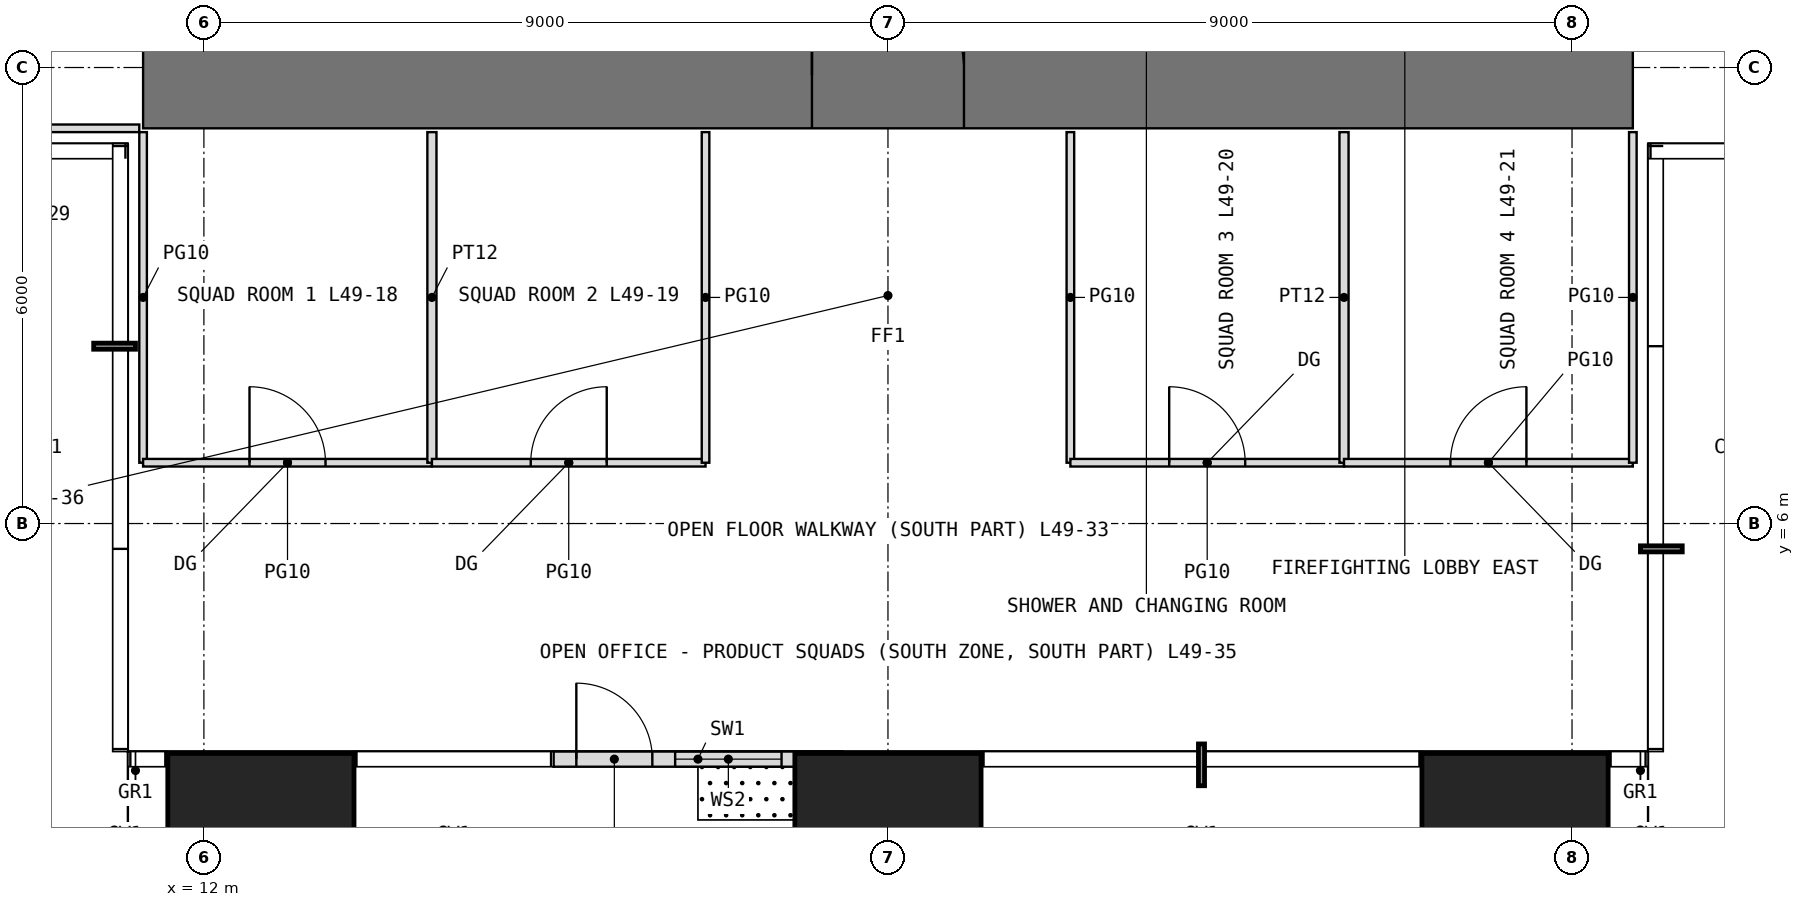
"""IFC4 building model, lengths in metres.
Left out: names, types, materials, properties, quantities, classifications, styles, units other than length and angle.
Written with IfcOpenShell. Run it as: python <this file> out.ifc"""

import sys

from ifc_helpers import new_model, si_unit, direction, frame, frame_2d, origin, origin_2d, place, context, subcontext, project, spatial, rectangle, extrude, element, fill, save


model = new_model("IFC4")
c1 = context("Model", 3, precision=1e-05, world=origin(), true_north=direction((0.0, 1.0)))
c2 = subcontext(c1, "Body", "Model", "MODEL_VIEW")
j1 = project(units=[si_unit("LENGTHUNIT", "METRE"), si_unit("PLANEANGLEUNIT", "RADIAN")], contexts=[c1])
p1 = place(None, origin())
s1 = spatial("IfcSite", under=j1, at=p1, CompositionType="ELEMENT")
p2 = place(p1, origin())
s2 = spatial("IfcBuilding", under=s1, at=p2, CompositionType="ELEMENT")
p3 = place(p2, frame((0.0, 0.0, 206.5)))
s3 = spatial("IfcBuildingStorey", under=s2, at=p3, CompositionType="ELEMENT", Elevation=206.5)
for number, where, z_axis, x_axis in (
    (1, (12.75, 1.75, 0.0), (0.0, 0.0, 1.0), (1.0, 0.0, 0.0)),
    (2, (21.0, 1.75, 0.0), (0.0, 0.0, 1.0), (1.0, 0.0, 0.0)),
    (3, (29.25, 1.75, 0.0), (0.0, 0.0, 1.0), (1.0, 0.0, 0.0)),
):
    element("IfcColumn", number, at=place(p3, frame(where, z_axis=z_axis, x_axis=x_axis)), inside=s3, PredefinedType="COLUMN", context=c2, shape_type="SweptSolid", body=[
        extrude(rectangle(XDim=2.45, YDim=2.45, at=origin_2d()), origin(), (0.0, 0.0, 1.0), 4.0),
    ])
p4 = place(p3, frame((16.6, 2.9, 0.0), z_axis=(0.0, 0.0, 1.0), x_axis=(1.0, 0.0, 0.0)))
e4 = element("IfcWall", 4, at=p4, inside=s3, PredefinedType="USERDEFINED", context=c2, shape_type="SweptSolid", body=[
    extrude(rectangle(XDim=3.8, YDim=0.2, at=frame_2d((1.9, 0.0))), origin(), (0.0, 0.0, 1.0), 3.75),
])
p5 = place(p4, frame((0.3, 0.0, 0.0)))
e5 = element("IfcOpeningElement", 5, at=p5, cuts=e4, PredefinedType="OPENING", context=c2, shape_type="SweptSolid", body=[
    extrude(rectangle(XDim=1.0, YDim=2.4, at=frame_2d((0.5, 1.2))), frame((0.0, 0.11, 0.0), z_axis=(0.0, -1.0, 0.0), x_axis=(1.0, 0.0, 0.0)), (0.0, 0.0, 1.0), 0.22),
])
p6 = place(p4, frame((1.6, 0.0, 0.3)))
e6 = element("IfcOpeningElement", 6, at=p6, cuts=e4, PredefinedType="OPENING", context=c2, shape_type="SweptSolid", body=[
    extrude(rectangle(XDim=1.4, YDim=2.7, at=frame_2d((0.7, 1.35))), frame((0.0, 0.11, 0.0), z_axis=(0.0, -1.0, 0.0), x_axis=(1.0, 0.0, 0.0)), (0.0, 0.0, 1.0), 0.22),
])
p7 = place(p3, frame((11.2, 11.9, -0.05), z_axis=(0.0, 0.0, 1.0), x_axis=(1.0, 0.0, 0.0)))
e7 = element("IfcWall", 7, at=p7, inside=s3, PredefinedType="SHEAR", context=c2, shape_type="SweptSolid", body=[
    extrude(rectangle(XDim=19.6, YDim=1.4, at=frame_2d((9.8, 0.0))), origin(), (0.0, 0.0, 1.0), 4.0),
])
p8 = place(p7, frame((8.8, 0.0, 0.05)))
e8 = element("IfcOpeningElement", 8, at=p8, cuts=e7, PredefinedType="OPENING", context=c2, shape_type="SweptSolid", body=[
    extrude(rectangle(XDim=2.0, YDim=2.2, at=frame_2d((1.0, 1.1))), frame((0.0, 0.71, 0.0), z_axis=(0.0, -1.0, 0.0), x_axis=(1.0, 0.0, 0.0)), (0.0, 0.0, 1.0), 1.42),
])
p9 = place(p3, frame((8.4, 11.2, 0.0), z_axis=(0.0, 0.0, 1.0), x_axis=(1.0, 0.0, 0.0)))
e9 = element("IfcWall", 9, at=p9, inside=s3, PredefinedType="PARTITIONING", context=c2, shape_type="SweptSolid", body=[
    extrude(rectangle(XDim=2.75, YDim=0.1, at=frame_2d((1.375, 0.0))), origin(), (0.0, 0.0, 1.0), 3.75),
])
p10 = place(p3, frame((11.2, 6.8, 0.0), z_axis=(0.0, 0.0, 1.0), x_axis=(0.0, 1.0, 0.0)))
e10 = element("IfcWall", 10, at=p10, inside=s3, PredefinedType="PARTITIONING", context=c2, shape_type="SweptSolid", body=[
    extrude(rectangle(XDim=4.35, YDim=0.1, at=frame_2d((2.175, 0.0))), origin(), (0.0, 0.0, 1.0), 3.75),
])
p11 = place(p3, frame((11.2, 6.8, 0.0), z_axis=(0.0, 0.0, 1.0), x_axis=(1.0, 0.0, 0.0)))
e11 = element("IfcWall", 11, at=p11, inside=s3, PredefinedType="PARTITIONING", context=c2, shape_type="SweptSolid", body=[
    extrude(rectangle(XDim=3.8, YDim=0.1, at=frame_2d((1.9, 0.0))), origin(), (0.0, 0.0, 1.0), 3.75),
])
p12 = place(p11, frame((1.4, 0.0, 0.0)))
e12 = element("IfcOpeningElement", 12, at=p12, cuts=e11, PredefinedType="OPENING", context=c2, shape_type="SweptSolid", body=[
    extrude(rectangle(XDim=1.0, YDim=2.4, at=frame_2d((0.5, 1.2))), frame((0.0, 0.06, 0.0), z_axis=(0.0, -1.0, 0.0), x_axis=(1.0, 0.0, 0.0)), (0.0, 0.0, 1.0), 0.12),
])
p13 = place(p3, frame((15.0, 6.8, 0.0), z_axis=(0.0, 0.0, 1.0), x_axis=(0.0, 1.0, 0.0)))
e13 = element("IfcWall", 13, at=p13, inside=s3, PredefinedType="PARTITIONING", context=c2, shape_type="SweptSolid", body=[
    extrude(rectangle(XDim=4.35, YDim=0.12, at=frame_2d((2.175, 0.0))), origin(), (0.0, 0.0, 1.0), 3.75),
])
p14 = place(p3, frame((15.0, 6.8, 0.0), z_axis=(0.0, 0.0, 1.0), x_axis=(1.0, 0.0, 0.0)))
e14 = element("IfcWall", 14, at=p14, inside=s3, PredefinedType="PARTITIONING", context=c2, shape_type="SweptSolid", body=[
    extrude(rectangle(XDim=3.6, YDim=0.1, at=frame_2d((1.8, 0.0))), origin(), (0.0, 0.0, 1.0), 3.75),
])
p15 = place(p14, frame((1.3, 0.0, 0.0)))
e15 = element("IfcOpeningElement", 15, at=p15, cuts=e14, PredefinedType="OPENING", context=c2, shape_type="SweptSolid", body=[
    extrude(rectangle(XDim=1.0, YDim=2.4, at=frame_2d((0.5, 1.2))), frame((0.0, 0.06, 0.0), z_axis=(0.0, -1.0, 0.0), x_axis=(1.0, 0.0, 0.0)), (0.0, 0.0, 1.0), 0.12),
])
for number, where, z_axis, x_axis in (
    (16, (18.6, 6.8, 0.0), (0.0, 0.0, 1.0), (0.0, 1.0, 0.0)),
    (17, (23.4, 6.8, 0.0), (0.0, 0.0, 1.0), (0.0, 1.0, 0.0)),
):
    element("IfcWall", number, at=place(p3, frame(where, z_axis=z_axis, x_axis=x_axis)), inside=s3, PredefinedType="PARTITIONING", context=c2, shape_type="SweptSolid", body=[
        extrude(rectangle(XDim=4.35, YDim=0.1, at=frame_2d((2.175, 0.0))), origin(), (0.0, 0.0, 1.0), 3.75),
    ])
p16 = place(p3, frame((23.4, 6.8, 0.0), z_axis=(0.0, 0.0, 1.0), x_axis=(1.0, 0.0, 0.0)))
e18 = element("IfcWall", 18, at=p16, inside=s3, PredefinedType="PARTITIONING", context=c2, shape_type="SweptSolid", body=[
    extrude(rectangle(XDim=3.6, YDim=0.1, at=frame_2d((1.8, 0.0))), origin(), (0.0, 0.0, 1.0), 3.75),
])
p17 = place(p16, frame((1.3, 0.0, 0.0)))
e19 = element("IfcOpeningElement", 19, at=p17, cuts=e18, PredefinedType="OPENING", context=c2, shape_type="SweptSolid", body=[
    extrude(rectangle(XDim=1.0, YDim=2.4, at=frame_2d((0.5, 1.2))), frame((0.0, 0.06, 0.0), z_axis=(0.0, -1.0, 0.0), x_axis=(1.0, 0.0, 0.0)), (0.0, 0.0, 1.0), 0.12),
])
p18 = place(p3, frame((27.0, 6.8, 0.0), z_axis=(0.0, 0.0, 1.0), x_axis=(0.0, 1.0, 0.0)))
e20 = element("IfcWall", 20, at=p18, inside=s3, PredefinedType="PARTITIONING", context=c2, shape_type="SweptSolid", body=[
    extrude(rectangle(XDim=4.35, YDim=0.12, at=frame_2d((2.175, 0.0))), origin(), (0.0, 0.0, 1.0), 3.75),
])
p19 = place(p3, frame((27.0, 6.8, 0.0), z_axis=(0.0, 0.0, 1.0), x_axis=(1.0, 0.0, 0.0)))
e21 = element("IfcWall", 21, at=p19, inside=s3, PredefinedType="PARTITIONING", context=c2, shape_type="SweptSolid", body=[
    extrude(rectangle(XDim=3.8, YDim=0.1, at=frame_2d((1.9, 0.0))), origin(), (0.0, 0.0, 1.0), 3.75),
])
p20 = place(p19, frame((1.4, 0.0, 0.0)))
e22 = element("IfcOpeningElement", 22, at=p20, cuts=e21, PredefinedType="OPENING", context=c2, shape_type="SweptSolid", body=[
    extrude(rectangle(XDim=1.0, YDim=2.4, at=frame_2d((0.5, 1.2))), frame((0.0, 0.06, 0.0), z_axis=(0.0, -1.0, 0.0), x_axis=(1.0, 0.0, 0.0)), (0.0, 0.0, 1.0), 0.12),
])
p21 = place(p3, frame((30.8, 6.8, 0.0), z_axis=(0.0, 0.0, 1.0), x_axis=(0.0, 1.0, 0.0)))
e23 = element("IfcWall", 23, at=p21, inside=s3, PredefinedType="PARTITIONING", context=c2, shape_type="SweptSolid", body=[
    extrude(rectangle(XDim=4.35, YDim=0.1, at=frame_2d((2.175, 0.0))), origin(), (0.0, 0.0, 1.0), 3.75),
])
p22 = place(p5, origin())
e24 = element("IfcDoor", 24, at=p22, inside=s3, OperationType="SINGLE_SWING_LEFT", PredefinedType="DOOR", context=c2, shape_type="SweptSolid", body=[
    extrude(rectangle(XDim=1.0, YDim=2.4, at=frame_2d((0.5, 1.2))), frame((0.0, 0.025, 0.0), z_axis=(0.0, -1.0, 0.0), x_axis=(1.0, 0.0, 0.0)), (0.0, 0.0, 1.0), 0.05),
])
fill(e5, e24)
p23 = place(p6, origin())
e25 = element("IfcWindow", 25, at=p23, inside=s3, PartitioningType="SINGLE_PANEL", PredefinedType="WINDOW", context=c2, shape_type="SweptSolid", body=[
    extrude(rectangle(XDim=1.4, YDim=2.7, at=frame_2d((0.7, 1.35))), frame((0.0, 0.03, 0.0), z_axis=(0.0, -1.0, 0.0), x_axis=(1.0, 0.0, 0.0)), (0.0, 0.0, 1.0), 0.06),
])
fill(e6, e25)
p24 = place(p8, origin())
e26 = element("IfcDoor", 26, at=p24, inside=s3, OperationType="DOUBLE_DOOR_SINGLE_SWING", PredefinedType="DOOR", context=c2, shape_type="SweptSolid", body=[
    extrude(rectangle(XDim=2.0, YDim=2.2, at=frame_2d((1.0, 1.1))), frame((0.0, 0.025, 0.0), z_axis=(0.0, -1.0, 0.0), x_axis=(1.0, 0.0, 0.0)), (0.0, 0.0, 1.0), 0.05),
])
fill(e8, e26)
p25 = place(p12, origin())
e27 = element("IfcDoor", 27, at=p25, inside=s3, OperationType="SINGLE_SWING_LEFT", PredefinedType="DOOR", context=c2, shape_type="SweptSolid", body=[
    extrude(rectangle(XDim=1.0, YDim=2.4, at=frame_2d((0.5, 1.2))), frame((0.0, 0.025, 0.0), z_axis=(0.0, -1.0, 0.0), x_axis=(1.0, 0.0, 0.0)), (0.0, 0.0, 1.0), 0.05),
])
fill(e12, e27)
p26 = place(p15, origin())
e28 = element("IfcDoor", 28, at=p26, inside=s3, OperationType="SINGLE_SWING_RIGHT", PredefinedType="DOOR", context=c2, shape_type="SweptSolid", body=[
    extrude(rectangle(XDim=1.0, YDim=2.4, at=frame_2d((0.5, 1.2))), frame((0.0, 0.025, 0.0), z_axis=(0.0, -1.0, 0.0), x_axis=(1.0, 0.0, 0.0)), (0.0, 0.0, 1.0), 0.05),
])
fill(e15, e28)
p27 = place(p17, origin())
e29 = element("IfcDoor", 29, at=p27, inside=s3, OperationType="SINGLE_SWING_LEFT", PredefinedType="DOOR", context=c2, shape_type="SweptSolid", body=[
    extrude(rectangle(XDim=1.0, YDim=2.4, at=frame_2d((0.5, 1.2))), frame((0.0, 0.025, 0.0), z_axis=(0.0, -1.0, 0.0), x_axis=(1.0, 0.0, 0.0)), (0.0, 0.0, 1.0), 0.05),
])
fill(e19, e29)
p28 = place(p20, origin())
e30 = element("IfcDoor", 30, at=p28, inside=s3, OperationType="SINGLE_SWING_RIGHT", PredefinedType="DOOR", context=c2, shape_type="SweptSolid", body=[
    extrude(rectangle(XDim=1.0, YDim=2.4, at=frame_2d((0.5, 1.2))), frame((0.0, 0.025, 0.0), z_axis=(0.0, -1.0, 0.0), x_axis=(1.0, 0.0, 0.0)), (0.0, 0.0, 1.0), 0.05),
])
fill(e22, e30)
save(model, sys.argv[1])
